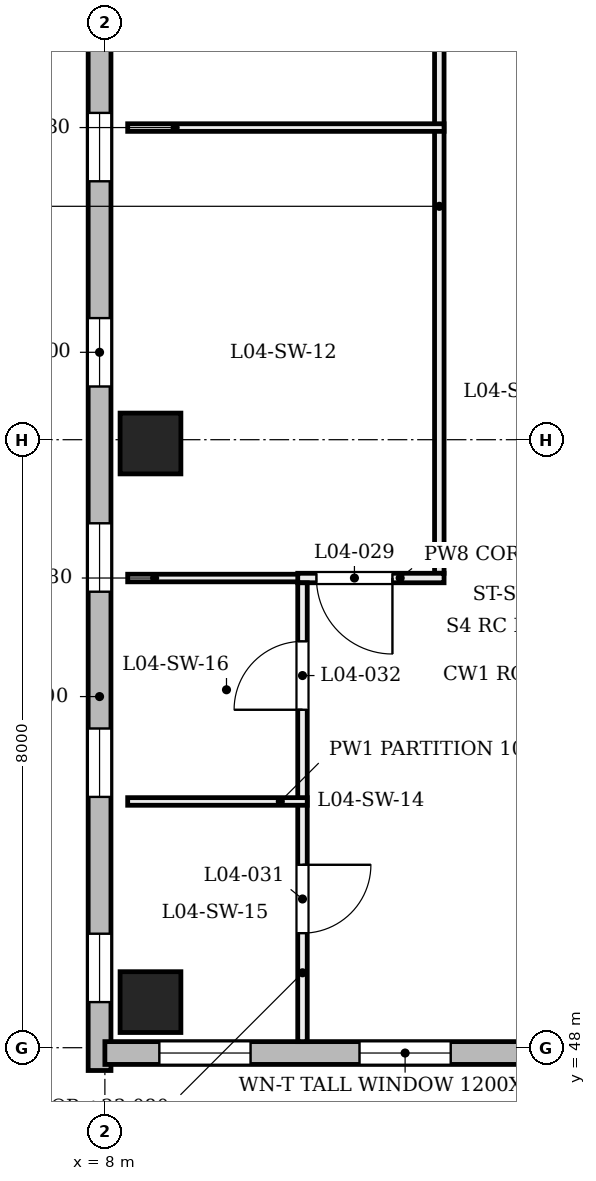
"""IFC4 building model, lengths in metres.
Left out: names, types, materials, properties, quantities, classifications, styles, units other than length and angle.
Written with IfcOpenShell. Run it as: python <this file> out.ifc"""

import sys

from ifc_helpers import new_model, si_unit, direction, frame, frame_2d, origin, origin_2d, place, context, subcontext, project, spatial, rectangle, extrude, element, fill, save


model = new_model("IFC4")
c1 = context("Model", 3, precision=1e-05, world=origin(), true_north=direction((0.0, 1.0)))
c2 = subcontext(c1, "Body", "Model", "MODEL_VIEW")
j1 = project(units=[si_unit("LENGTHUNIT", "METRE"), si_unit("PLANEANGLEUNIT", "RADIAN")], contexts=[c1])
p1 = place(None, origin())
s1 = spatial("IfcSite", under=j1, at=p1, CompositionType="ELEMENT")
p2 = place(p1, origin())
s2 = spatial("IfcBuilding", under=s1, at=p2, CompositionType="ELEMENT")
p3 = place(p2, frame((0.0, 0.0, 19.2)))
s3 = spatial("IfcBuildingStorey", under=s2, at=p3, CompositionType="ELEMENT", Elevation=19.2)
for number, where, z_axis, x_axis in (
    (1, (8.6, 48.6, 0.0), (0.0, 0.0, 1.0), (1.0, 0.0, 0.0)),
    (2, (8.6, 55.95, 0.0), (0.0, 0.0, 1.0), (1.0, 0.0, 0.0)),
):
    element("IfcColumn", number, at=place(p3, frame(where, z_axis=z_axis, x_axis=x_axis)), inside=s3, PredefinedType="COLUMN", context=c2, shape_type="SweptSolid", body=[
        extrude(rectangle(XDim=0.8, YDim=0.8, at=origin_2d()), origin(), (0.0, 0.0, 1.0), 4.8),
    ])
p4 = place(p3, frame((7.93, 47.7, 0.0), z_axis=(0.0, 0.0, 1.0), x_axis=(0.0, 1.0, 0.0)))
e3 = element("IfcWall", 3, at=p4, inside=s3, PredefinedType="SOLIDWALL", context=c2, shape_type="SweptSolid", body=[
    extrude(rectangle(XDim=16.4, YDim=0.3, at=frame_2d((8.2, 0.0))), origin(), (0.0, 0.0, 1.0), 3.9),
])
p5 = place(p4, frame((0.9, 0.0, 0.75)))
e4 = element("IfcOpeningElement", 4, at=p5, cuts=e3, PredefinedType="OPENING", context=c2, shape_type="SweptSolid", body=[
    extrude(rectangle(XDim=0.9, YDim=3.1, at=frame_2d((0.45, 1.55))), frame((0.0, 0.16, 0.0), z_axis=(0.0, -1.0, 0.0), x_axis=(1.0, 0.0, 0.0)), (0.0, 0.0, 1.0), 0.32),
])
p6 = place(p4, frame((3.6, 0.0, 0.75)))
e5 = element("IfcOpeningElement", 5, at=p6, cuts=e3, PredefinedType="OPENING", context=c2, shape_type="SweptSolid", body=[
    extrude(rectangle(XDim=0.9, YDim=3.1, at=frame_2d((0.45, 1.55))), frame((0.0, 0.16, 0.0), z_axis=(0.0, -1.0, 0.0), x_axis=(1.0, 0.0, 0.0)), (0.0, 0.0, 1.0), 0.32),
])
p7 = place(p4, frame((6.3, 0.0, 0.75)))
e6 = element("IfcOpeningElement", 6, at=p7, cuts=e3, PredefinedType="OPENING", context=c2, shape_type="SweptSolid", body=[
    extrude(rectangle(XDim=0.9, YDim=3.1, at=frame_2d((0.45, 1.55))), frame((0.0, 0.16, 0.0), z_axis=(0.0, -1.0, 0.0), x_axis=(1.0, 0.0, 0.0)), (0.0, 0.0, 1.0), 0.32),
])
p8 = place(p4, frame((9.0, 0.0, 0.75)))
e7 = element("IfcOpeningElement", 7, at=p8, cuts=e3, PredefinedType="OPENING", context=c2, shape_type="SweptSolid", body=[
    extrude(rectangle(XDim=0.9, YDim=3.1, at=frame_2d((0.45, 1.55))), frame((0.0, 0.16, 0.0), z_axis=(0.0, -1.0, 0.0), x_axis=(1.0, 0.0, 0.0)), (0.0, 0.0, 1.0), 0.32),
])
p9 = place(p4, frame((11.7, 0.0, 0.75)))
e8 = element("IfcOpeningElement", 8, at=p9, cuts=e3, PredefinedType="OPENING", context=c2, shape_type="SweptSolid", body=[
    extrude(rectangle(XDim=0.9, YDim=3.1, at=frame_2d((0.45, 1.55))), frame((0.0, 0.16, 0.0), z_axis=(0.0, -1.0, 0.0), x_axis=(1.0, 0.0, 0.0)), (0.0, 0.0, 1.0), 0.32),
])
p10 = place(p4, frame((14.4, 0.0, 0.75)))
e9 = element("IfcOpeningElement", 9, at=p10, cuts=e3, PredefinedType="OPENING", context=c2, shape_type="SweptSolid", body=[
    extrude(rectangle(XDim=0.9, YDim=3.1, at=frame_2d((0.45, 1.55))), frame((0.0, 0.16, 0.0), z_axis=(0.0, -1.0, 0.0), x_axis=(1.0, 0.0, 0.0)), (0.0, 0.0, 1.0), 0.32),
])
p11 = place(p3, frame((8.0, 47.93, 0.0), z_axis=(0.0, 0.0, 1.0), x_axis=(1.0, 0.0, 0.0)))
e10 = element("IfcWall", 10, at=p11, inside=s3, PredefinedType="SOLIDWALL", context=c2, shape_type="SweptSolid", body=[
    extrude(rectangle(XDim=7.9, YDim=0.3, at=frame_2d((3.95, 0.0))), origin(), (0.0, 0.0, 1.0), 3.9),
])
p12 = place(p11, frame((0.717, 0.0, 0.75)))
e11 = element("IfcOpeningElement", 11, at=p12, cuts=e10, PredefinedType="OPENING", context=c2, shape_type="SweptSolid", body=[
    extrude(rectangle(XDim=1.2, YDim=3.1, at=frame_2d((0.6, 1.55))), frame((0.0, 0.16, 0.0), z_axis=(0.0, -1.0, 0.0), x_axis=(1.0, 0.0, 0.0)), (0.0, 0.0, 1.0), 0.32),
])
p13 = place(p11, frame((3.35, 0.0, 0.75)))
e12 = element("IfcOpeningElement", 12, at=p13, cuts=e10, PredefinedType="OPENING", context=c2, shape_type="SweptSolid", body=[
    extrude(rectangle(XDim=1.2, YDim=3.1, at=frame_2d((0.6, 1.55))), frame((0.0, 0.16, 0.0), z_axis=(0.0, -1.0, 0.0), x_axis=(1.0, 0.0, 0.0)), (0.0, 0.0, 1.0), 0.32),
])
p14 = place(p11, frame((5.983, 0.0, 0.75)))
e13 = element("IfcOpeningElement", 13, at=p14, cuts=e10, PredefinedType="OPENING", context=c2, shape_type="SweptSolid", body=[
    extrude(rectangle(XDim=1.2, YDim=3.1, at=frame_2d((0.6, 1.55))), frame((0.0, 0.16, 0.0), z_axis=(0.0, -1.0, 0.0), x_axis=(1.0, 0.0, 0.0)), (0.0, 0.0, 1.0), 0.32),
])
p15 = place(p3, frame((12.4, 54.242, 0.0), z_axis=(0.0, 0.0, 1.0), x_axis=(0.0, 1.0, 0.0)))
e14 = element("IfcWall", 14, at=p15, inside=s3, PredefinedType="PARTITIONING", context=c2, shape_type="SweptSolid", body=[
    extrude(rectangle(XDim=9.658, YDim=0.125, at=frame_2d((4.829, 0.0))), origin(), (0.0, 0.0, 1.0), 3.88),
])
p16 = place(p15, frame((7.447, 0.0, 0.0)))
e15 = element("IfcOpeningElement", 15, at=p16, cuts=e14, PredefinedType="OPENING", context=c2, shape_type="SweptSolid", body=[
    extrude(rectangle(XDim=1.0, YDim=2.1, at=frame_2d((0.5, 1.05))), frame((0.0, 0.073, 0.0), z_axis=(0.0, -1.0, 0.0), x_axis=(1.0, 0.0, 0.0)), (0.0, 0.0, 1.0), 0.145),
])
p17 = place(p3, frame((8.3, 54.18, 0.0), z_axis=(0.0, 0.0, 1.0), x_axis=(1.0, 0.0, 0.0)))
e16 = element("IfcWall", 16, at=p17, inside=s3, PredefinedType="PARTITIONING", context=c2, shape_type="SweptSolid", body=[
    extrude(rectangle(XDim=2.363, YDim=0.1, at=frame_2d((1.181, 0.0))), origin(), (0.0, 0.0, 1.0), 3.98),
])
p18 = place(p3, frame((10.538, 54.18, 0.0), z_axis=(0.0, 0.0, 1.0), x_axis=(1.0, 0.0, 0.0)))
e17 = element("IfcWall", 17, at=p18, inside=s3, PredefinedType="PARTITIONING", context=c2, shape_type="SweptSolid", body=[
    extrude(rectangle(XDim=1.925, YDim=0.125, at=frame_2d((0.962, 0.0))), origin(), (0.0, 0.0, 1.0), 4.56),
])
p19 = place(p18, frame((0.246, 0.0, 0.0)))
e18 = element("IfcOpeningElement", 18, at=p19, cuts=e17, PredefinedType="OPENING", context=c2, shape_type="SweptSolid", body=[
    extrude(rectangle(XDim=1.0, YDim=2.1, at=frame_2d((0.5, 1.05))), frame((0.0, 0.073, 0.0), z_axis=(0.0, -1.0, 0.0), x_axis=(1.0, 0.0, 0.0)), (0.0, 0.0, 1.0), 0.145),
])
p20 = place(p3, frame((8.3, 60.107, 0.0), z_axis=(0.0, 0.0, 1.0), x_axis=(1.0, 0.0, 0.0)))
e19 = element("IfcWall", 19, at=p20, inside=s3, PredefinedType="PARTITIONING", context=c2, shape_type="SweptSolid", body=[
    extrude(rectangle(XDim=4.162, YDim=0.1, at=frame_2d((2.081, 0.0))), origin(), (0.0, 0.0, 1.0), 3.98),
])
p21 = place(p3, frame((10.6, 48.08, 0.0), z_axis=(0.0, 0.0, 1.0), x_axis=(0.0, 1.0, 0.0)))
e20 = element("IfcWall", 20, at=p21, inside=s3, PredefinedType="PARTITIONING", context=c2, shape_type="SweptSolid", body=[
    extrude(rectangle(XDim=6.037, YDim=0.125, at=frame_2d((3.019, 0.0))), origin(), (0.0, 0.0, 1.0), 3.88),
])
p22 = place(p21, frame((1.427, 0.0, 0.0)))
e21 = element("IfcOpeningElement", 21, at=p22, cuts=e20, PredefinedType="OPENING", context=c2, shape_type="SweptSolid", body=[
    extrude(rectangle(XDim=0.9, YDim=2.1, at=frame_2d((0.45, 1.05))), frame((0.0, 0.073, 0.0), z_axis=(0.0, -1.0, 0.0), x_axis=(1.0, 0.0, 0.0)), (0.0, 0.0, 1.0), 0.145),
])
p23 = place(p21, frame((4.367, 0.0, 0.0)))
e22 = element("IfcOpeningElement", 22, at=p23, cuts=e20, PredefinedType="OPENING", context=c2, shape_type="SweptSolid", body=[
    extrude(rectangle(XDim=0.9, YDim=2.1, at=frame_2d((0.45, 1.05))), frame((0.0, 0.073, 0.0), z_axis=(0.0, -1.0, 0.0), x_axis=(1.0, 0.0, 0.0)), (0.0, 0.0, 1.0), 0.145),
])
p24 = place(p3, frame((8.3, 51.24, 0.0), z_axis=(0.0, 0.0, 1.0), x_axis=(1.0, 0.0, 0.0)))
e23 = element("IfcWall", 23, at=p24, inside=s3, PredefinedType="PARTITIONING", context=c2, shape_type="SweptSolid", body=[
    extrude(rectangle(XDim=2.363, YDim=0.1, at=frame_2d((1.181, 0.0))), origin(), (0.0, 0.0, 1.0), 3.98),
])
p25 = place(p5, origin())
e24 = element("IfcWindow", 24, at=p25, inside=s3, PartitioningType="SINGLE_PANEL", PredefinedType="WINDOW", context=c2, shape_type="SweptSolid", body=[
    extrude(rectangle(XDim=0.9, YDim=3.1, at=frame_2d((0.45, 1.55))), frame((0.0, 0.03, 0.0), z_axis=(0.0, -1.0, 0.0), x_axis=(1.0, 0.0, 0.0)), (0.0, 0.0, 1.0), 0.06),
])
fill(e4, e24)
p26 = place(p6, origin())
e25 = element("IfcWindow", 25, at=p26, inside=s3, PartitioningType="SINGLE_PANEL", PredefinedType="WINDOW", context=c2, shape_type="SweptSolid", body=[
    extrude(rectangle(XDim=0.9, YDim=3.1, at=frame_2d((0.45, 1.55))), frame((0.0, 0.03, 0.0), z_axis=(0.0, -1.0, 0.0), x_axis=(1.0, 0.0, 0.0)), (0.0, 0.0, 1.0), 0.06),
])
fill(e5, e25)
p27 = place(p7, origin())
e26 = element("IfcWindow", 26, at=p27, inside=s3, PartitioningType="SINGLE_PANEL", PredefinedType="WINDOW", context=c2, shape_type="SweptSolid", body=[
    extrude(rectangle(XDim=0.9, YDim=3.1, at=frame_2d((0.45, 1.55))), frame((0.0, 0.03, 0.0), z_axis=(0.0, -1.0, 0.0), x_axis=(1.0, 0.0, 0.0)), (0.0, 0.0, 1.0), 0.06),
])
fill(e6, e26)
p28 = place(p8, origin())
e27 = element("IfcWindow", 27, at=p28, inside=s3, PartitioningType="SINGLE_PANEL", PredefinedType="WINDOW", context=c2, shape_type="SweptSolid", body=[
    extrude(rectangle(XDim=0.9, YDim=3.1, at=frame_2d((0.45, 1.55))), frame((0.0, 0.03, 0.0), z_axis=(0.0, -1.0, 0.0), x_axis=(1.0, 0.0, 0.0)), (0.0, 0.0, 1.0), 0.06),
])
fill(e7, e27)
p29 = place(p9, origin())
e28 = element("IfcWindow", 28, at=p29, inside=s3, PartitioningType="SINGLE_PANEL", PredefinedType="WINDOW", context=c2, shape_type="SweptSolid", body=[
    extrude(rectangle(XDim=0.9, YDim=3.1, at=frame_2d((0.45, 1.55))), frame((0.0, 0.03, 0.0), z_axis=(0.0, -1.0, 0.0), x_axis=(1.0, 0.0, 0.0)), (0.0, 0.0, 1.0), 0.06),
])
fill(e8, e28)
p30 = place(p12, origin())
e29 = element("IfcWindow", 29, at=p30, inside=s3, PartitioningType="SINGLE_PANEL", PredefinedType="WINDOW", context=c2, shape_type="SweptSolid", body=[
    extrude(rectangle(XDim=1.2, YDim=3.1, at=frame_2d((0.6, 1.55))), frame((0.0, 0.03, 0.0), z_axis=(0.0, -1.0, 0.0), x_axis=(1.0, 0.0, 0.0)), (0.0, 0.0, 1.0), 0.06),
])
fill(e11, e29)
p31 = place(p13, origin())
e30 = element("IfcWindow", 30, at=p31, inside=s3, PartitioningType="SINGLE_PANEL", PredefinedType="WINDOW", context=c2, shape_type="SweptSolid", body=[
    extrude(rectangle(XDim=1.2, YDim=3.1, at=frame_2d((0.6, 1.55))), frame((0.0, 0.03, 0.0), z_axis=(0.0, -1.0, 0.0), x_axis=(1.0, 0.0, 0.0)), (0.0, 0.0, 1.0), 0.06),
])
fill(e12, e30)
p32 = place(p19, origin())
e31 = element("IfcDoor", 31, at=p32, inside=s3, OperationType="SINGLE_SWING_RIGHT", PredefinedType="DOOR", context=c2, shape_type="SweptSolid", body=[
    extrude(rectangle(XDim=1.0, YDim=2.1, at=frame_2d((0.5, 1.05))), frame((0.0, 0.025, 0.0), z_axis=(0.0, -1.0, 0.0), x_axis=(1.0, 0.0, 0.0)), (0.0, 0.0, 1.0), 0.05),
])
fill(e18, e31)
p33 = place(p22, origin())
e32 = element("IfcDoor", 32, at=p33, inside=s3, OperationType="SINGLE_SWING_RIGHT", PredefinedType="DOOR", context=c2, shape_type="SweptSolid", body=[
    extrude(rectangle(XDim=0.9, YDim=2.1, at=frame_2d((0.45, 1.05))), frame((0.0, 0.025, 0.0), z_axis=(0.0, -1.0, 0.0), x_axis=(1.0, 0.0, 0.0)), (0.0, 0.0, 1.0), 0.05),
])
fill(e21, e32)
p34 = place(p23, origin())
e33 = element("IfcDoor", 33, at=p34, inside=s3, OperationType="SINGLE_SWING_LEFT", PredefinedType="DOOR", context=c2, shape_type="SweptSolid", body=[
    extrude(rectangle(XDim=0.9, YDim=2.1, at=frame_2d((0.45, 1.05))), frame((0.0, 0.025, 0.0), z_axis=(0.0, -1.0, 0.0), x_axis=(1.0, 0.0, 0.0)), (0.0, 0.0, 1.0), 0.05),
])
fill(e22, e33)
save(model, sys.argv[1])
